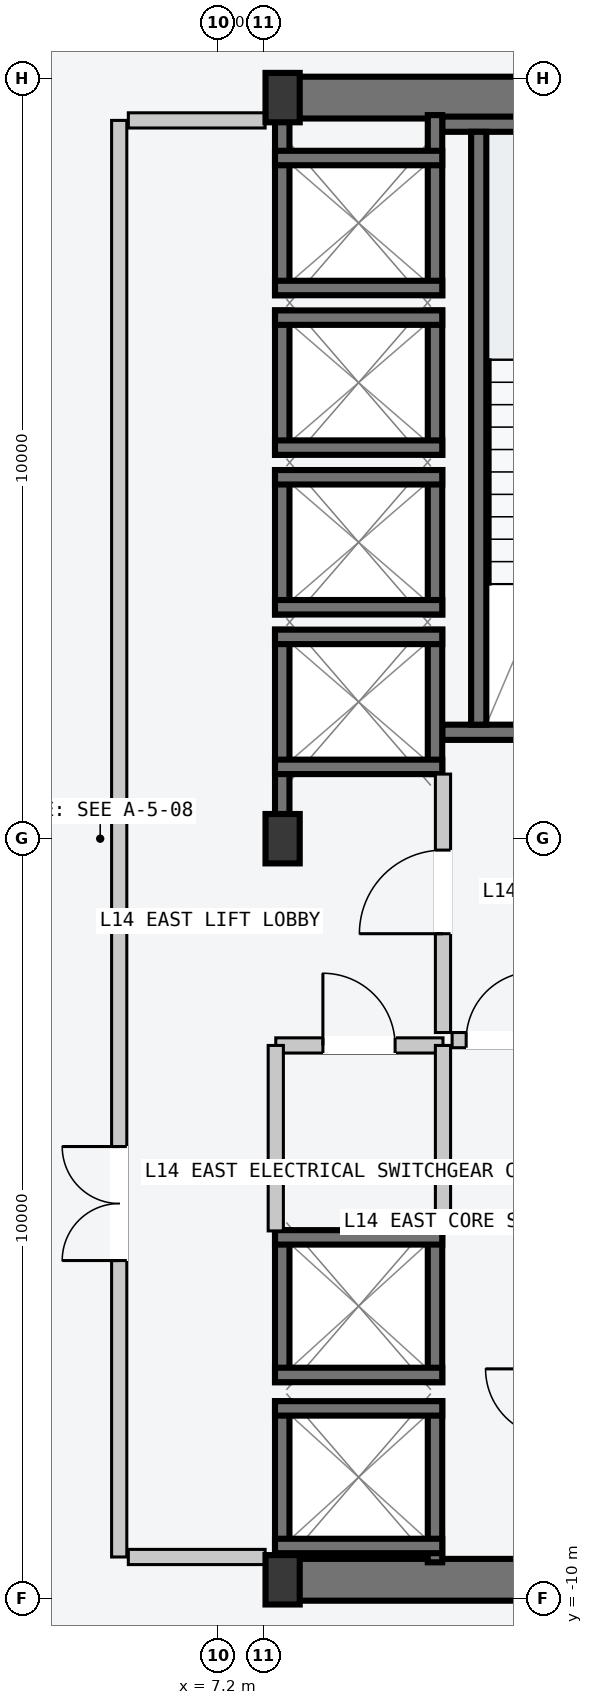
"""IFC4 building model, lengths in metres.
Left out: names, types, materials, properties, quantities, classifications, styles, units other than length and angle.
Written with IfcOpenShell. Run it as: python <this file> out.ifc"""

import sys

from ifc_helpers import new_model, si_unit, direction, frame, frame_2d, origin, origin_2d, place, context, subcontext, project, spatial, rectangle, i_section, extrude, element, fill, save


model = new_model("IFC4")
c1 = context("Model", 3, precision=1e-05, world=origin(), true_north=direction((0.0, 1.0)))
c2 = subcontext(c1, "Body", "Model", "MODEL_VIEW")
j1 = project(units=[si_unit("LENGTHUNIT", "METRE"), si_unit("PLANEANGLEUNIT", "RADIAN")], contexts=[c1])
p1 = place(None, origin())
s1 = spatial("IfcSite", under=j1, at=p1, CompositionType="ELEMENT")
p2 = place(p1, origin())
s2 = spatial("IfcBuilding", under=s1, at=p2, CompositionType="ELEMENT")
p3 = place(p2, frame((0.0, 0.0, 56.4)))
s3 = spatial("IfcBuildingStorey", under=s2, at=p3, CompositionType="ELEMENT", Elevation=56.4)
for number, where, z_axis, x_axis in (
    (1, (8.07, -9.75, -0.2), (0.0, 0.0, 1.0), (1.0, 0.0, 0.0)),
    (2, (8.07, 9.75, -0.2), (0.0, 0.0, 1.0), (1.0, 0.0, 0.0)),
):
    element("IfcWall", number, at=place(p3, frame(where, z_axis=z_axis, x_axis=x_axis)), inside=s3, PredefinedType="SHEAR", context=c2, shape_type="SweptSolid", body=[
        extrude(rectangle(XDim=6.46, YDim=0.55, at=frame_2d((3.23, 0.0))), origin(), (0.0, 0.0, 1.0), 3.6),
    ])
p4 = place(p3, frame((10.15, 1.4, -0.2), z_axis=(0.0, 0.0, 1.0), x_axis=(1.0, 0.0, 0.0)))
e3 = element("IfcWall", 3, at=p4, inside=s3, PredefinedType="SOLIDWALL", context=c2, shape_type="SweptSolid", body=[
    extrude(rectangle(XDim=4.1, YDim=0.2, at=frame_2d((2.05, 0.0))), origin(), (0.0, 0.0, 1.0), 3.6),
])
p5 = place(p4, frame((1.5, 0.0, 0.2)))
e4 = element("IfcOpeningElement", 4, at=p5, cuts=e3, PredefinedType="OPENING", context=c2, shape_type="SweptSolid", body=[
    extrude(rectangle(XDim=1.12, YDim=2.18, at=frame_2d((0.56, 1.09))), frame((0.0, 0.11, 0.0), z_axis=(0.0, -1.0, 0.0), x_axis=(1.0, 0.0, 0.0)), (0.0, 0.0, 1.0), 0.22),
])
p6 = place(p3, frame((10.15, 9.4, -0.2), z_axis=(0.0, 0.0, 1.0), x_axis=(1.0, 0.0, 0.0)))
e5 = element("IfcWall", 5, at=p6, inside=s3, PredefinedType="SOLIDWALL", context=c2, shape_type="SweptSolid", body=[
    extrude(rectangle(XDim=4.1, YDim=0.2, at=frame_2d((2.05, 0.0))), origin(), (0.0, 0.0, 1.0), 3.6),
])
p7 = place(p3, frame((10.63, 1.5, -0.2), z_axis=(0.0, 0.0, 1.0), x_axis=(0.0, 1.0, 0.0)))
e6 = element("IfcWall", 6, at=p7, inside=s3, PredefinedType="SOLIDWALL", context=c2, shape_type="SweptSolid", body=[
    extrude(rectangle(XDim=7.8, YDim=0.2, at=frame_2d((3.9, 0.0))), origin(), (0.0, 0.0, 1.0), 3.6),
])
for number, where, z_axis, x_axis in (
    (7, (8.05, -9.75, 0.0), (0.0, 0.0, 1.0), (1.0, 0.0, 0.0)),
    (8, (8.05, 0.0, 0.0), (0.0, 0.0, 1.0), (1.0, 0.0, 0.0)),
    (9, (8.05, 9.75, 0.0), (0.0, 0.0, 1.0), (1.0, 0.0, 0.0)),
):
    element("IfcColumn", number, at=place(p3, frame(where, z_axis=z_axis, x_axis=x_axis)), inside=s3, PredefinedType="COLUMN", context=c2, shape_type="SweptSolid", body=[
        extrude(i_section(OverallWidth=0.45, OverallDepth=0.65, WebThickness=0.025, FlangeThickness=0.04, at=origin_2d()), origin(), (0.0, 0.0, 1.0), 3.6),
    ])
p8 = place(p3, frame((8.045, 0.21, -0.2), z_axis=(0.0, 0.0, 1.0), x_axis=(0.0, 1.0, 0.0)))
e10 = element("IfcWall", 10, at=p8, inside=s3, PredefinedType="SOLIDWALL", context=c2, shape_type="SweptSolid", body=[
    extrude(rectangle(XDim=2.54, YDim=0.19, at=frame_2d((1.27, 0.0))), origin(), (0.0, 0.0, 1.0), 3.6),
])
p9 = place(p3, frame((10.055, 0.85, -0.2), z_axis=(0.0, 0.0, 1.0), x_axis=(0.0, 1.0, 0.0)))
e11 = element("IfcWall", 11, at=p9, inside=s3, PredefinedType="SOLIDWALL", context=c2, shape_type="SweptSolid", body=[
    extrude(rectangle(XDim=1.9, YDim=0.19, at=frame_2d((0.95, 0.0))), origin(), (0.0, 0.0, 1.0), 3.6),
])
for number, where, z_axis, x_axis in (
    (12, (7.95, 2.655, -0.2), (0.0, 0.0, 1.0), (1.0, 0.0, 0.0)),
    (13, (7.95, 0.945, -0.2), (0.0, 0.0, 1.0), (1.0, 0.0, 0.0)),
):
    element("IfcWall", number, at=place(p3, frame(where, z_axis=z_axis, x_axis=x_axis)), inside=s3, PredefinedType="SOLIDWALL", context=c2, shape_type="SweptSolid", body=[
        extrude(rectangle(XDim=2.2, YDim=0.19, at=frame_2d((1.1, 0.0))), origin(), (0.0, 0.0, 1.0), 3.6),
    ])
for number, where, z_axis, x_axis in (
    (14, (8.045, 2.95, -0.2), (0.0, 0.0, 1.0), (0.0, 1.0, 0.0)),
    (15, (10.055, 2.95, -0.2), (0.0, 0.0, 1.0), (0.0, 1.0, 0.0)),
):
    element("IfcWall", number, at=place(p3, frame(where, z_axis=z_axis, x_axis=x_axis)), inside=s3, PredefinedType="SOLIDWALL", context=c2, shape_type="SweptSolid", body=[
        extrude(rectangle(XDim=1.9, YDim=0.19, at=frame_2d((0.95, 0.0))), origin(), (0.0, 0.0, 1.0), 3.6),
    ])
for number, where, z_axis, x_axis in (
    (16, (7.95, 4.755, -0.2), (0.0, 0.0, 1.0), (1.0, 0.0, 0.0)),
    (17, (7.95, 3.045, -0.2), (0.0, 0.0, 1.0), (1.0, 0.0, 0.0)),
):
    element("IfcWall", number, at=place(p3, frame(where, z_axis=z_axis, x_axis=x_axis)), inside=s3, PredefinedType="SOLIDWALL", context=c2, shape_type="SweptSolid", body=[
        extrude(rectangle(XDim=2.2, YDim=0.19, at=frame_2d((1.1, 0.0))), origin(), (0.0, 0.0, 1.0), 3.6),
    ])
for number, where, z_axis, x_axis in (
    (18, (8.045, 5.05, -0.2), (0.0, 0.0, 1.0), (0.0, 1.0, 0.0)),
    (19, (10.055, 5.05, -0.2), (0.0, 0.0, 1.0), (0.0, 1.0, 0.0)),
):
    element("IfcWall", number, at=place(p3, frame(where, z_axis=z_axis, x_axis=x_axis)), inside=s3, PredefinedType="SOLIDWALL", context=c2, shape_type="SweptSolid", body=[
        extrude(rectangle(XDim=1.9, YDim=0.19, at=frame_2d((0.95, 0.0))), origin(), (0.0, 0.0, 1.0), 3.6),
    ])
for number, where, z_axis, x_axis in (
    (20, (7.95, 6.855, -0.2), (0.0, 0.0, 1.0), (1.0, 0.0, 0.0)),
    (21, (7.95, 5.145, -0.2), (0.0, 0.0, 1.0), (1.0, 0.0, 0.0)),
):
    element("IfcWall", number, at=place(p3, frame(where, z_axis=z_axis, x_axis=x_axis)), inside=s3, PredefinedType="SOLIDWALL", context=c2, shape_type="SweptSolid", body=[
        extrude(rectangle(XDim=2.2, YDim=0.19, at=frame_2d((1.1, 0.0))), origin(), (0.0, 0.0, 1.0), 3.6),
    ])
for number, where, z_axis, x_axis in (
    (22, (8.045, 7.15, -0.2), (0.0, 0.0, 1.0), (0.0, 1.0, 0.0)),
    (23, (10.055, 7.15, -0.2), (0.0, 0.0, 1.0), (0.0, 1.0, 0.0)),
):
    element("IfcWall", number, at=place(p3, frame(where, z_axis=z_axis, x_axis=x_axis)), inside=s3, PredefinedType="SOLIDWALL", context=c2, shape_type="SweptSolid", body=[
        extrude(rectangle(XDim=2.37, YDim=0.19, at=frame_2d((1.185, 0.0))), origin(), (0.0, 0.0, 1.0), 3.6),
    ])
for number, where, z_axis, x_axis in (
    (24, (7.95, 8.955, -0.2), (0.0, 0.0, 1.0), (1.0, 0.0, 0.0)),
    (25, (7.95, 7.245, -0.2), (0.0, 0.0, 1.0), (1.0, 0.0, 0.0)),
):
    element("IfcWall", number, at=place(p3, frame(where, z_axis=z_axis, x_axis=x_axis)), inside=s3, PredefinedType="SOLIDWALL", context=c2, shape_type="SweptSolid", body=[
        extrude(rectangle(XDim=2.2, YDim=0.19, at=frame_2d((1.1, 0.0))), origin(), (0.0, 0.0, 1.0), 3.6),
    ])
for number, where, z_axis, x_axis in (
    (26, (8.045, -9.52, -0.2), (0.0, 0.0, 1.0), (0.0, 1.0, 0.0)),
    (27, (10.055, -9.52, -0.2), (0.0, 0.0, 1.0), (0.0, 1.0, 0.0)),
):
    element("IfcWall", number, at=place(p3, frame(where, z_axis=z_axis, x_axis=x_axis)), inside=s3, PredefinedType="SOLIDWALL", context=c2, shape_type="SweptSolid", body=[
        extrude(rectangle(XDim=2.12, YDim=0.19, at=frame_2d((1.06, 0.0))), origin(), (0.0, 0.0, 1.0), 3.6),
    ])
for number, where, z_axis, x_axis in (
    (28, (7.95, -7.495, -0.2), (0.0, 0.0, 1.0), (1.0, 0.0, 0.0)),
    (29, (7.95, -9.305, -0.2), (0.0, 0.0, 1.0), (1.0, 0.0, 0.0)),
):
    element("IfcWall", number, at=place(p3, frame(where, z_axis=z_axis, x_axis=x_axis)), inside=s3, PredefinedType="SOLIDWALL", context=c2, shape_type="SweptSolid", body=[
        extrude(rectangle(XDim=2.2, YDim=0.19, at=frame_2d((1.1, 0.0))), origin(), (0.0, 0.0, 1.0), 3.6),
    ])
for number, where, z_axis, x_axis in (
    (30, (8.045, -7.15, -0.2), (0.0, 0.0, 1.0), (0.0, 1.0, 0.0)),
    (31, (10.055, -7.15, -0.2), (0.0, 0.0, 1.0), (0.0, 1.0, 0.0)),
):
    element("IfcWall", number, at=place(p3, frame(where, z_axis=z_axis, x_axis=x_axis)), inside=s3, PredefinedType="SOLIDWALL", context=c2, shape_type="SweptSolid", body=[
        extrude(rectangle(XDim=2.0, YDim=0.19, at=frame_2d((1.0, 0.0))), origin(), (0.0, 0.0, 1.0), 3.6),
    ])
for number, where, z_axis, x_axis in (
    (32, (7.95, -5.245, -0.2), (0.0, 0.0, 1.0), (1.0, 0.0, 0.0)),
    (33, (7.95, -7.055, -0.2), (0.0, 0.0, 1.0), (1.0, 0.0, 0.0)),
):
    element("IfcWall", number, at=place(p3, frame(where, z_axis=z_axis, x_axis=x_axis)), inside=s3, PredefinedType="SOLIDWALL", context=c2, shape_type="SweptSolid", body=[
        extrude(rectangle(XDim=2.2, YDim=0.19, at=frame_2d((1.1, 0.0))), origin(), (0.0, 0.0, 1.0), 3.6),
    ])
p10 = place(p3, frame((5.9, -9.45, 0.0), z_axis=(0.0, 0.0, 1.0), x_axis=(0.0, 1.0, 0.0)))
e34 = element("IfcWall", 34, at=p10, inside=s3, PredefinedType="PARTITIONING", context=c2, shape_type="SweptSolid", body=[
    extrude(rectangle(XDim=18.9, YDim=0.2, at=frame_2d((9.45, 0.0))), origin(), (0.0, 0.0, 1.0), 3.4),
])
p11 = place(p10, frame((3.9, 0.0, 0.0)))
e35 = element("IfcOpeningElement", 35, at=p11, cuts=e34, PredefinedType="OPENING", context=c2, shape_type="SweptSolid", body=[
    extrude(rectangle(XDim=1.5, YDim=2.2, at=frame_2d((0.75, 1.1))), frame((0.0, 0.11, 0.0), z_axis=(0.0, -1.0, 0.0), x_axis=(1.0, 0.0, 0.0)), (0.0, 0.0, 1.0), 0.22),
])
for number, where, z_axis, x_axis in (
    (36, (6.02, -9.45, 0.0), (0.0, 0.0, 1.0), (1.0, 0.0, 0.0)),
    (37, (6.02, 9.45, 0.0), (0.0, 0.0, 1.0), (1.0, 0.0, 0.0)),
):
    element("IfcWall", number, at=place(p3, frame(where, z_axis=z_axis, x_axis=x_axis)), inside=s3, PredefinedType="PARTITIONING", context=c2, shape_type="SweptSolid", body=[
        extrude(rectangle(XDim=1.8, YDim=0.2, at=frame_2d((0.9, 0.0))), origin(), (0.0, 0.0, 1.0), 3.4),
    ])
p12 = place(p3, frame((10.16, -2.55, 0.0), z_axis=(0.0, 0.0, 1.0), x_axis=(0.0, 1.0, 0.0)))
e38 = element("IfcWall", 38, at=p12, inside=s3, PredefinedType="PARTITIONING", context=c2, shape_type="SweptSolid", body=[
    extrude(rectangle(XDim=3.4, YDim=0.2, at=frame_2d((1.7, 0.0))), origin(), (0.0, 0.0, 1.0), 3.4),
])
p13 = place(p12, frame((1.3, 0.0, 0.0)))
e39 = element("IfcOpeningElement", 39, at=p13, cuts=e38, PredefinedType="OPENING", context=c2, shape_type="SweptSolid", body=[
    extrude(rectangle(XDim=1.1, YDim=2.15, at=frame_2d((0.55, 1.075))), frame((0.0, 0.11, 0.0), z_axis=(0.0, -1.0, 0.0), x_axis=(1.0, 0.0, 0.0)), (0.0, 0.0, 1.0), 0.22),
])
p14 = place(p3, frame((10.28, -2.65, 0.0), z_axis=(0.0, 0.0, 1.0), x_axis=(1.0, 0.0, 0.0)))
e40 = element("IfcWall", 40, at=p14, inside=s3, PredefinedType="PARTITIONING", context=c2, shape_type="SweptSolid", body=[
    extrude(rectangle(XDim=1.27, YDim=0.2, at=frame_2d((0.635, 0.0))), origin(), (0.0, 0.0, 1.0), 3.4),
])
p15 = place(p14, frame((0.185, 0.0, 0.0)))
e41 = element("IfcOpeningElement", 41, at=p15, cuts=e40, PredefinedType="OPENING", context=c2, shape_type="SweptSolid", body=[
    extrude(rectangle(XDim=0.9, YDim=2.15, at=frame_2d((0.45, 1.075))), frame((0.0, 0.11, 0.0), z_axis=(0.0, -1.0, 0.0), x_axis=(1.0, 0.0, 0.0)), (0.0, 0.0, 1.0), 0.22),
])
p16 = place(p3, frame((7.96, -2.72, 0.0), z_axis=(0.0, 0.0, 1.0), x_axis=(1.0, 0.0, 0.0)))
e42 = element("IfcWall", 42, at=p16, inside=s3, PredefinedType="PARTITIONING", context=c2, shape_type="SweptSolid", body=[
    extrude(rectangle(XDim=2.2, YDim=0.2, at=frame_2d((1.1, 0.0))), origin(), (0.0, 0.0, 1.0), 3.4),
])
p17 = place(p16, frame((0.62, 0.0, 0.0)))
e43 = element("IfcOpeningElement", 43, at=p17, cuts=e42, PredefinedType="OPENING", context=c2, shape_type="SweptSolid", body=[
    extrude(rectangle(XDim=0.95, YDim=2.1, at=frame_2d((0.475, 1.05))), frame((0.0, 0.11, 0.0), z_axis=(0.0, -1.0, 0.0), x_axis=(1.0, 0.0, 0.0)), (0.0, 0.0, 1.0), 0.22),
])
for number, where, z_axis, x_axis in (
    (44, (7.96, -5.16, 0.0), (0.0, 0.0, 1.0), (0.0, 1.0, 0.0)),
    (45, (10.16, -5.16, 0.0), (0.0, 0.0, 1.0), (0.0, 1.0, 0.0)),
):
    element("IfcWall", number, at=place(p3, frame(where, z_axis=z_axis, x_axis=x_axis)), inside=s3, PredefinedType="PARTITIONING", context=c2, shape_type="SweptSolid", body=[
        extrude(rectangle(XDim=2.44, YDim=0.2, at=frame_2d((1.22, 0.0))), origin(), (0.0, 0.0, 1.0), 3.4),
    ])
p18 = place(p11, origin())
e46 = element("IfcDoor", 46, at=p18, inside=s3, OperationType="DOUBLE_DOOR_SINGLE_SWING", PredefinedType="DOOR", context=c2, shape_type="SweptSolid", body=[
    extrude(rectangle(XDim=1.5, YDim=2.2, at=frame_2d((0.75, 1.1))), frame((0.0, 0.025, 0.0), z_axis=(0.0, -1.0, 0.0), x_axis=(1.0, 0.0, 0.0)), (0.0, 0.0, 1.0), 0.05),
])
fill(e35, e46)
p19 = place(p13, origin())
e47 = element("IfcDoor", 47, at=p19, inside=s3, OperationType="SINGLE_SWING_LEFT", PredefinedType="DOOR", context=c2, shape_type="SweptSolid", body=[
    extrude(rectangle(XDim=1.1, YDim=2.15, at=frame_2d((0.55, 1.075))), frame((0.0, 0.025, 0.0), z_axis=(0.0, -1.0, 0.0), x_axis=(1.0, 0.0, 0.0)), (0.0, 0.0, 1.0), 0.05),
])
fill(e39, e47)
p20 = place(p15, origin())
e48 = element("IfcDoor", 48, at=p20, inside=s3, OperationType="SINGLE_SWING_RIGHT", PredefinedType="DOOR", context=c2, shape_type="SweptSolid", body=[
    extrude(rectangle(XDim=0.9, YDim=2.15, at=frame_2d((0.45, 1.075))), frame((0.0, 0.025, 0.0), z_axis=(0.0, -1.0, 0.0), x_axis=(1.0, 0.0, 0.0)), (0.0, 0.0, 1.0), 0.05),
])
fill(e41, e48)
p21 = place(p17, origin())
e49 = element("IfcDoor", 49, at=p21, inside=s3, OperationType="SINGLE_SWING_LEFT", PredefinedType="DOOR", context=c2, shape_type="SweptSolid", body=[
    extrude(rectangle(XDim=0.95, YDim=2.1, at=frame_2d((0.475, 1.05))), frame((0.0, 0.025, 0.0), z_axis=(0.0, -1.0, 0.0), x_axis=(1.0, 0.0, 0.0)), (0.0, 0.0, 1.0), 0.05),
])
fill(e43, e49)
save(model, sys.argv[1])
